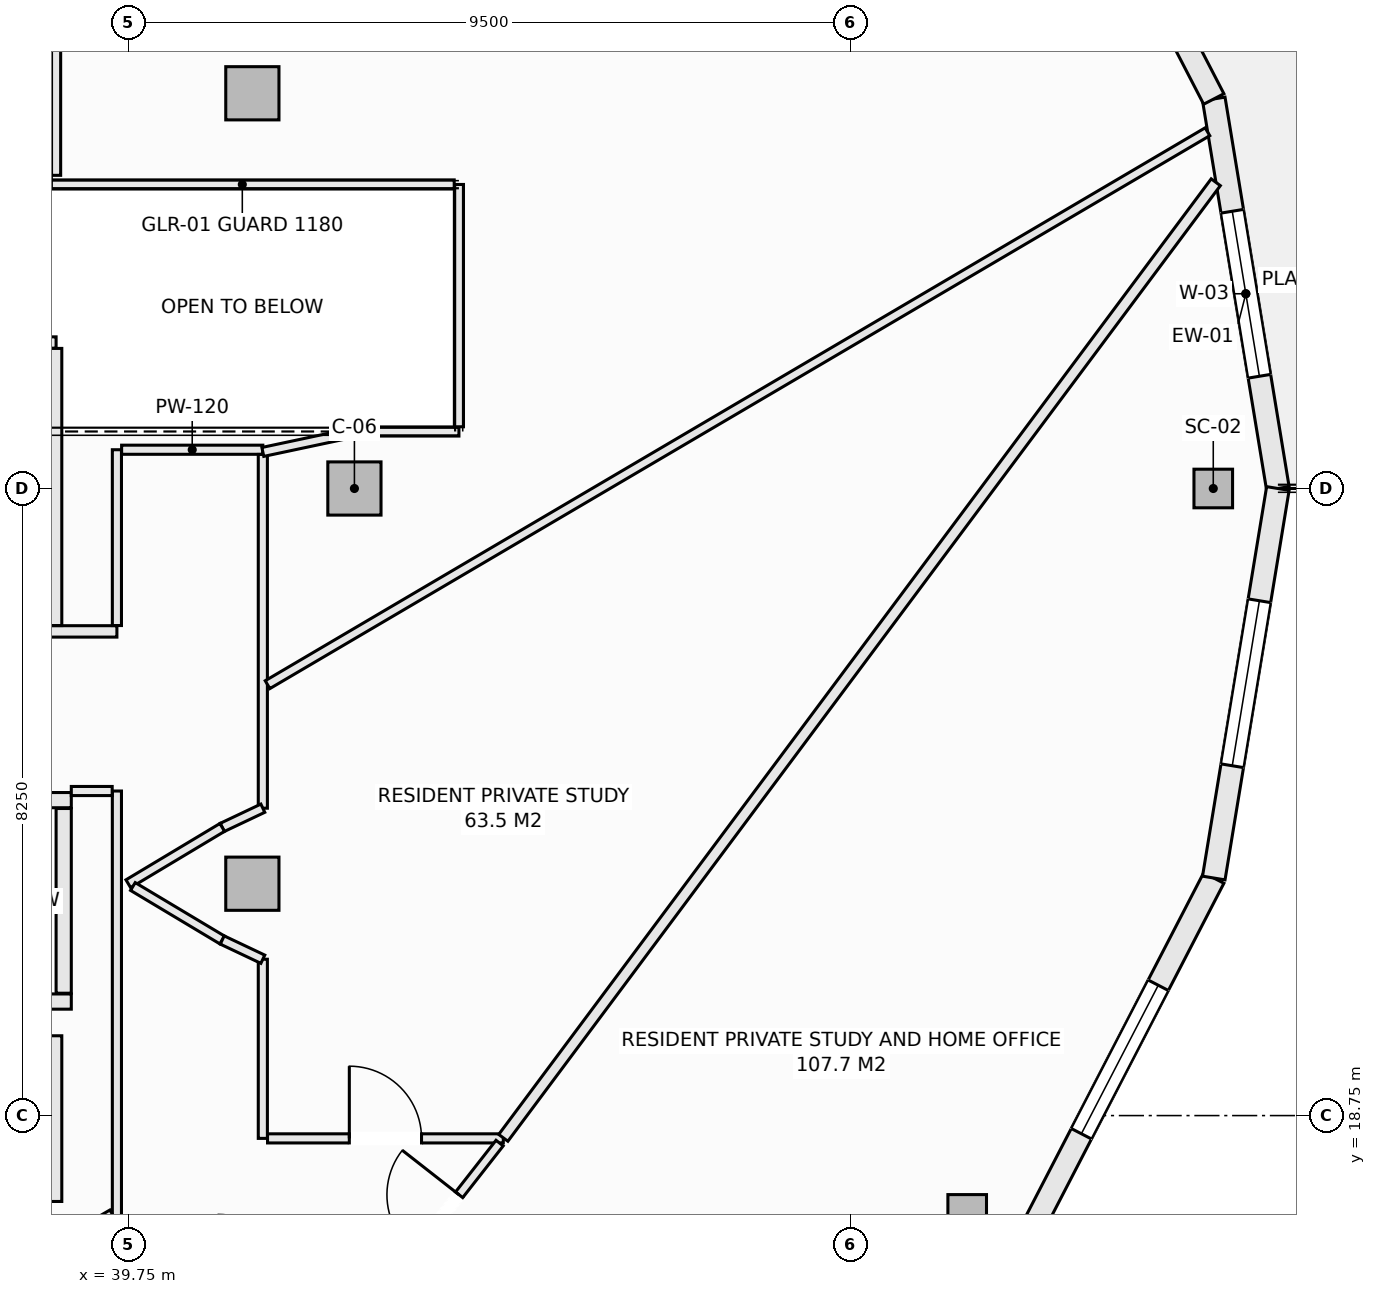
"""IFC4 building model, lengths in metres.
Left out: names, types, materials, properties, quantities, classifications, styles, units other than length and angle.
Written with IfcOpenShell. Run it as: python <this file> out.ifc"""

import sys

from ifc_helpers import new_model, si_unit, direction, frame, frame_2d, origin, origin_2d, place, context, subcontext, project, spatial, rectangle, hollow_rectangle, extrude, element, fill, save


model = new_model("IFC4")
c1 = context("Model", 3, precision=1e-05, world=origin(), true_north=direction((0.0, 1.0)))
c2 = subcontext(c1, "Body", "Model", "MODEL_VIEW")
j1 = project(units=[si_unit("LENGTHUNIT", "METRE"), si_unit("PLANEANGLEUNIT", "RADIAN")], contexts=[c1])
p1 = place(None, origin())
s1 = spatial("IfcSite", under=j1, at=p1, CompositionType="ELEMENT")
p2 = place(p1, origin())
s2 = spatial("IfcBuilding", under=s1, at=p2, CompositionType="ELEMENT")
p3 = place(p2, frame((0.0, 0.0, 199.7)))
s3 = spatial("IfcBuildingStorey", under=s2, at=p3, CompositionType="ELEMENT", Elevation=199.7)
for number, where, z_axis, x_axis in (
    (1, (54.025, 27.0, -0.27), (0.0, 0.0, 1.0), (1.0, 0.0, 0.0)),
    (2, (50.787, 17.456, -0.27), (0.0, 0.0, 1.0), (1.0, 0.0, 0.0)),
):
    element("IfcColumn", number, at=place(p3, frame(where, z_axis=z_axis, x_axis=x_axis)), inside=s3, PredefinedType="COLUMN", context=c2, shape_type="SweptSolid", body=[
        extrude(hollow_rectangle(XDim=0.508, YDim=0.508, WallThickness=0.019, at=origin_2d()), origin(), (0.0, 0.0, 1.0), 3.3),
    ])
for number, where, z_axis, x_axis in (
    (3, (42.725, 27.0, -0.27), (0.0, 0.0, 1.0), (1.0, 0.0, 0.0)),
    (4, (41.382, 32.199, -0.27), (0.0, 0.0, 1.0), (1.0, 0.0, 0.0)),
    (5, (41.382, 21.801, -0.27), (0.0, 0.0, 1.0), (1.0, 0.0, 0.0)),
):
    element("IfcColumn", number, at=place(p3, frame(where, z_axis=z_axis, x_axis=x_axis)), inside=s3, PredefinedType="COLUMN", context=c2, shape_type="SweptSolid", body=[
        extrude(rectangle(XDim=0.7, YDim=0.7, at=origin_2d()), origin(), (0.0, 0.0, 1.0), 3.3),
    ])
p4 = place(p3, frame((54.032, 32.125, 0.0), z_axis=(0.0, 0.0, 1.0), x_axis=(0.16237087798, -0.986729799886, 0.0)))
e6 = element("IfcWall", 6, at=p4, inside=s3, PredefinedType="SOLIDWALL", context=c2, shape_type="SweptSolid", body=[
    extrude(rectangle(XDim=5.193, YDim=0.3, at=frame_2d((2.597, 0.0))), origin(), (0.0, 0.0, 1.0), 2.605),
])
p5 = place(p4, frame((1.497, 0.0, 0.72)))
e7 = element("IfcOpeningElement", 7, at=p5, cuts=e6, PredefinedType="OPENING", context=c2, shape_type="SweptSolid", body=[
    extrude(rectangle(XDim=2.2, YDim=1.65, at=frame_2d((1.1, 0.825))), frame((0.0, 0.16, 0.0), z_axis=(0.0, -1.0, 0.0), x_axis=(1.0, 0.0, 0.0)), (0.0, 0.0, 1.0), 0.32),
])
p6 = place(p3, frame((51.559, 36.9, 0.0), z_axis=(0.0, 0.0, 1.0), x_axis=(0.459808219482, -0.888018243786, 0.0)))
e8 = element("IfcWall", 8, at=p6, inside=s3, PredefinedType="SOLIDWALL", context=c2, shape_type="SweptSolid", body=[
    extrude(rectangle(XDim=5.378, YDim=0.3, at=frame_2d((2.689, 0.0))), origin(), (0.0, 0.0, 1.0), 2.605),
])
p7 = place(p6, frame((1.789, 0.0, 0.0)))
e9 = element("IfcOpeningElement", 9, at=p7, cuts=e8, PredefinedType="OPENING", context=c2, shape_type="SweptSolid", body=[
    extrude(rectangle(XDim=1.8, YDim=2.25, at=frame_2d((0.9, 1.125))), frame((0.0, 0.16, 0.0), z_axis=(0.0, -1.0, 0.0), x_axis=(1.0, 0.0, 0.0)), (0.0, 0.0, 1.0), 0.32),
])
p8 = place(p3, frame((51.559, 17.1, 0.0), z_axis=(0.0, 0.0, 1.0), x_axis=(0.459808219482, 0.888018243786, 0.0)))
e10 = element("IfcWall", 10, at=p8, inside=s3, PredefinedType="SOLIDWALL", context=c2, shape_type="SweptSolid", body=[
    extrude(rectangle(XDim=5.378, YDim=0.3, at=frame_2d((2.689, 0.0))), origin(), (0.0, 0.0, 1.0), 2.605),
])
p9 = place(p8, frame((1.589, 0.0, 0.72)))
e11 = element("IfcOpeningElement", 11, at=p9, cuts=e10, PredefinedType="OPENING", context=c2, shape_type="SweptSolid", body=[
    extrude(rectangle(XDim=2.2, YDim=1.65, at=frame_2d((1.1, 0.825))), frame((0.0, 0.16, 0.0), z_axis=(0.0, -1.0, 0.0), x_axis=(1.0, 0.0, 0.0)), (0.0, 0.0, 1.0), 0.32),
])
p10 = place(p3, frame((54.032, 21.875, 0.0), z_axis=(0.0, 0.0, 1.0), x_axis=(0.16237087798, 0.986729799886, 0.0)))
e12 = element("IfcWall", 12, at=p10, inside=s3, PredefinedType="SOLIDWALL", context=c2, shape_type="SweptSolid", body=[
    extrude(rectangle(XDim=5.193, YDim=0.3, at=frame_2d((2.597, 0.0))), origin(), (0.0, 0.0, 1.0), 2.605),
])
p11 = place(p10, frame((1.497, 0.0, 0.72)))
e13 = element("IfcOpeningElement", 13, at=p11, cuts=e12, PredefinedType="OPENING", context=c2, shape_type="SweptSolid", body=[
    extrude(rectangle(XDim=2.2, YDim=1.65, at=frame_2d((1.1, 0.825))), frame((0.0, 0.16, 0.0), z_axis=(0.0, -1.0, 0.0), x_axis=(1.0, 0.0, 0.0)), (0.0, 0.0, 1.0), 0.32),
])
p12 = place(p3, frame((36.75, 22.9, 0.0), z_axis=(0.0, 0.0, 1.0), x_axis=(1.0, 0.0, 0.0)))
e14 = element("IfcWall", 14, at=p12, inside=s3, PredefinedType="SOLIDWALL", context=c2, shape_type="SweptSolid", body=[
    extrude(rectangle(XDim=2.25, YDim=0.2, at=frame_2d((1.125, 0.0))), origin(), (0.0, 0.0, 1.0), 3.03),
])
p13 = place(p12, frame((0.575, 0.0, 0.0)))
e15 = element("IfcOpeningElement", 15, at=p13, cuts=e14, PredefinedType="OPENING", context=c2, shape_type="SweptSolid", body=[
    extrude(rectangle(XDim=1.1, YDim=2.2, at=frame_2d((0.55, 1.1))), frame((0.0, 0.11, 0.0), z_axis=(0.0, -1.0, 0.0), x_axis=(1.0, 0.0, 0.0)), (0.0, 0.0, 1.0), 0.22),
])
p14 = place(p3, frame((36.75, 20.25, 0.0), z_axis=(0.0, 0.0, 1.0), x_axis=(1.0, 0.0, 0.0)))
e16 = element("IfcWall", 16, at=p14, inside=s3, PredefinedType="SOLIDWALL", context=c2, shape_type="SweptSolid", body=[
    extrude(rectangle(XDim=2.25, YDim=0.2, at=frame_2d((1.125, 0.0))), origin(), (0.0, 0.0, 1.0), 3.03),
])
p15 = place(p3, frame((38.9, 20.36, 0.0), z_axis=(0.0, 0.0, 1.0), x_axis=(0.0, 1.0, 0.0)))
e17 = element("IfcWall", 17, at=p15, inside=s3, PredefinedType="SOLIDWALL", context=c2, shape_type="SweptSolid", body=[
    extrude(rectangle(XDim=2.43, YDim=0.2, at=frame_2d((1.215, 0.0))), origin(), (0.0, 0.0, 1.0), 3.03),
])
p16 = place(p3, frame((29.96, 25.12, 0.0), z_axis=(0.0, 0.0, 1.0), x_axis=(1.0, 0.0, 0.0)))
e18 = element("IfcWall", 18, at=p16, inside=s3, PredefinedType="PARTITIONING", context=c2, shape_type="SweptSolid", body=[
    extrude(rectangle(XDim=9.64, YDim=0.15, at=frame_2d((4.82, 0.0))), origin(), (0.0, 0.0, 1.0), 3.03),
])
p17 = place(p16, frame((3.05, 0.0, 0.0)))
e19 = element("IfcOpeningElement", 19, at=p17, cuts=e18, PredefinedType="OPENING", context=c2, shape_type="SweptSolid", body=[
    extrude(rectangle(XDim=0.95, YDim=2.1, at=frame_2d((0.475, 1.05))), frame((0.0, 0.085, 0.0), z_axis=(0.0, -1.0, 0.0), x_axis=(1.0, 0.0, 0.0)), (0.0, 0.0, 1.0), 0.17),
])
p18 = place(p16, frame((7.265, 0.0, 0.0)))
e20 = element("IfcOpeningElement", 20, at=p18, cuts=e18, PredefinedType="OPENING", context=c2, shape_type="SweptSolid", body=[
    extrude(rectangle(XDim=0.95, YDim=2.1, at=frame_2d((0.475, 1.05))), frame((0.0, 0.085, 0.0), z_axis=(0.0, -1.0, 0.0), x_axis=(1.0, 0.0, 0.0)), (0.0, 0.0, 1.0), 0.17),
])
p19 = place(p3, frame((30.077, 28.92, 0.0), z_axis=(0.0, 0.0, 1.0), x_axis=(1.0, 0.0, 0.0)))
e21 = element("IfcWall", 21, at=p19, inside=s3, PredefinedType="PARTITIONING", context=c2, shape_type="SweptSolid", body=[
    extrude(rectangle(XDim=8.723, YDim=0.15, at=frame_2d((4.362, 0.0))), origin(), (0.0, 0.0, 1.0), 3.03),
])
p20 = place(p3, frame((38.8, 17.62, 0.0), z_axis=(0.0, 0.0, 1.0), x_axis=(0.0, 1.0, 0.0)))
e22 = element("IfcWall", 22, at=p20, inside=s3, PredefinedType="PARTITIONING", context=c2, shape_type="SweptSolid", body=[
    extrude(rectangle(XDim=2.18, YDim=0.15, at=frame_2d((1.09, 0.0))), origin(), (0.0, 0.0, 1.0), 3.03),
])
p21 = place(p3, frame((38.8, 25.197, 0.0), z_axis=(0.0, 0.0, 1.0), x_axis=(0.0, 1.0, 0.0)))
e23 = element("IfcWall", 23, at=p21, inside=s3, PredefinedType="PARTITIONING", context=c2, shape_type="SweptSolid", body=[
    extrude(rectangle(XDim=3.646, YDim=0.15, at=frame_2d((1.823, 0.0))), origin(), (0.0, 0.0, 1.0), 3.03),
])
p22 = place(p3, frame((38.8, 31.12, 0.0), z_axis=(0.0, 0.0, 1.0), x_axis=(0.0, 1.0, 0.0)))
e24 = element("IfcWall", 24, at=p22, inside=s3, PredefinedType="PARTITIONING", context=c2, shape_type="SweptSolid", body=[
    extrude(rectangle(XDim=2.63, YDim=0.12, at=frame_2d((1.315, 0.0))), origin(), (0.0, 0.0, 1.0), 3.03),
])
p23 = place(p3, frame((39.6, 16.5, 0.0), z_axis=(0.0, 0.0, 1.0), x_axis=(0.0, 1.0, 0.0)))
e25 = element("IfcWall", 25, at=p23, inside=s3, PredefinedType="PARTITIONING", context=c2, shape_type="SweptSolid", body=[
    extrude(rectangle(XDim=6.52, YDim=0.12, at=frame_2d((3.26, 0.0))), origin(), (0.0, 0.0, 1.0), 2.478),
])
p24 = place(p3, frame((39.6, 25.197, 0.0), z_axis=(0.0, 0.0, 1.0), x_axis=(0.0, 1.0, 0.0)))
e26 = element("IfcWall", 26, at=p24, inside=s3, PredefinedType="PARTITIONING", context=c2, shape_type="SweptSolid", body=[
    extrude(rectangle(XDim=2.313, YDim=0.12, at=frame_2d((1.156, 0.0))), origin(), (0.0, 0.0, 1.0), 3.03),
])
p25 = place(p3, frame((39.662, 27.51, 0.0), z_axis=(0.0, 0.0, 1.0), x_axis=(1.0, 0.0, 0.0)))
e27 = element("IfcWall", 27, at=p25, inside=s3, PredefinedType="PARTITIONING", context=c2, shape_type="SweptSolid", body=[
    extrude(rectangle(XDim=1.858, YDim=0.12, at=frame_2d((0.929, 0.0))), origin(), (0.0, 0.0, 1.0), 3.03),
])
p26 = place(p3, frame((41.52, 18.45, 0.0), z_axis=(0.0, 0.0, 1.0), x_axis=(0.0, 1.0, 0.0)))
e28 = element("IfcWall", 28, at=p26, inside=s3, PredefinedType="PARTITIONING", context=c2, shape_type="SweptSolid", body=[
    extrude(rectangle(XDim=2.357, YDim=0.12, at=frame_2d((1.178, 0.0))), origin(), (0.0, 0.0, 1.0), 3.03),
])
p27 = place(p3, frame((41.52, 22.794, 0.0), z_axis=(0.0, 0.0, 1.0), x_axis=(0.0, 1.0, 0.0)))
e29 = element("IfcWall", 29, at=p27, inside=s3, PredefinedType="PARTITIONING", context=c2, shape_type="SweptSolid", body=[
    extrude(rectangle(XDim=4.654, YDim=0.12, at=frame_2d((2.327, 0.0))), origin(), (0.0, 0.0, 1.0), 2.478),
])
p28 = place(p3, frame((40.986, 22.541, 0.0), z_axis=(0.0, 0.0, 1.0), x_axis=(0.903729424576, 0.428104107847, 0.0)))
e30 = element("IfcWall", 30, at=p28, inside=s3, PredefinedType="PARTITIONING", context=c2, shape_type="SweptSolid", body=[
    extrude(rectangle(XDim=0.591, YDim=0.12, at=frame_2d((0.295, 0.0))), origin(), (0.0, 0.0, 1.0), 3.03),
])
p29 = place(p3, frame((39.75, 21.8, 0.0), z_axis=(0.0, 0.0, 1.0), x_axis=(0.857702120906, 0.514146935996, 0.0)))
e31 = element("IfcWall", 31, at=p29, inside=s3, PredefinedType="PARTITIONING", context=c2, shape_type="SweptSolid", body=[
    extrude(rectangle(XDim=1.441, YDim=0.12, at=frame_2d((0.721, 0.0))), origin(), (0.0, 0.0, 1.0), 3.03),
])
p30 = place(p3, frame((39.81, 21.764, 0.0), z_axis=(0.0, 0.0, 1.0), x_axis=(0.858011245414, -0.513630901273, 0.0)))
e32 = element("IfcWall", 32, at=p30, inside=s3, PredefinedType="PARTITIONING", context=c2, shape_type="SweptSolid", body=[
    extrude(rectangle(XDim=1.37, YDim=0.12, at=frame_2d((0.685, 0.0))), origin(), (0.0, 0.0, 1.0), 3.03),
])
p31 = place(p3, frame((40.986, 21.06, 0.0), z_axis=(0.0, 0.0, 1.0), x_axis=(0.90356951601, -0.428441512621, 0.0)))
e33 = element("IfcWall", 33, at=p31, inside=s3, PredefinedType="PARTITIONING", context=c2, shape_type="SweptSolid", body=[
    extrude(rectangle(XDim=0.591, YDim=0.12, at=frame_2d((0.295, 0.0))), origin(), (0.0, 0.0, 1.0), 3.03),
])
p32 = place(p3, frame((41.582, 18.45, 0.0), z_axis=(0.0, 0.0, 1.0), x_axis=(1.0, 0.0, 0.0)))
e34 = element("IfcWall", 34, at=p32, inside=s3, PredefinedType="PARTITIONING", context=c2, shape_type="SweptSolid", body=[
    extrude(rectangle(XDim=3.102, YDim=0.12, at=frame_2d((1.551, 0.0))), origin(), (0.0, 0.0, 1.0), 3.03),
])
p33 = place(p32, frame((1.076, 0.0, 0.0)))
e35 = element("IfcOpeningElement", 35, at=p33, cuts=e34, PredefinedType="OPENING", context=c2, shape_type="SweptSolid", body=[
    extrude(rectangle(XDim=0.95, YDim=2.1, at=frame_2d((0.475, 1.05))), frame((0.0, 0.07, 0.0), z_axis=(0.0, -1.0, 0.0), x_axis=(1.0, 0.0, 0.0)), (0.0, 0.0, 1.0), 0.14),
])
p34 = place(p3, frame((43.157, 16.5, 0.0), z_axis=(0.0, 0.0, 1.0), x_axis=(0.616566276607, 0.787303008092, 0.0)))
e36 = element("IfcWall", 36, at=p34, inside=s3, PredefinedType="PARTITIONING", context=c2, shape_type="SweptSolid", body=[
    extrude(rectangle(XDim=2.398, YDim=0.12, at=frame_2d((1.199, 0.0))), origin(), (0.0, 0.0, 1.0), 3.03),
])
p35 = place(p34, frame((0.584, 0.0, 0.0)))
e37 = element("IfcOpeningElement", 37, at=p35, cuts=e36, PredefinedType="OPENING", context=c2, shape_type="SweptSolid", body=[
    extrude(rectangle(XDim=0.95, YDim=2.1, at=frame_2d((0.475, 1.05))), frame((0.0, 0.07, 0.0), z_axis=(0.0, -1.0, 0.0), x_axis=(1.0, 0.0, 0.0)), (0.0, 0.0, 1.0), 0.14),
])
p36 = place(p3, frame((39.0, 23.02, 0.0), z_axis=(0.0, 0.0, 1.0), x_axis=(1.0, 0.0, 0.0)))
e38 = element("IfcWall", 38, at=p36, inside=s3, PredefinedType="PARTITIONING", context=c2, shape_type="SweptSolid", body=[
    extrude(rectangle(XDim=0.538, YDim=0.12, at=frame_2d((0.269, 0.0))), origin(), (0.0, 0.0, 1.0), 3.03),
])
p37 = place(p3, frame((41.582, 24.419, 0.0), z_axis=(0.0, 0.0, 1.0), x_axis=(0.861940776748, 0.507008971694, 0.0)))
e39 = element("IfcWall", 39, at=p37, inside=s3, PredefinedType="PARTITIONING", context=c2, shape_type="SweptSolid", body=[
    extrude(rectangle(XDim=14.347, YDim=0.12, at=frame_2d((7.174, 0.0))), origin(), (0.0, 0.0, 1.0), 2.478),
])
p38 = place(p3, frame((36.112, 15.466, 0.0), z_axis=(0.0, 0.0, 1.0), x_axis=(0.864713842027, 0.502264841898, 0.0)))
e40 = element("IfcWall", 40, at=p38, inside=s3, PredefinedType="PARTITIONING", context=c2, shape_type="SweptSolid", body=[
    extrude(rectangle(XDim=3.962, YDim=0.12, at=frame_2d((1.981, 0.0))), origin(), (0.0, 0.0, 1.0), 2.478),
])
p39 = place(p3, frame((44.684, 18.457, 0.0), z_axis=(0.0, 0.0, 1.0), x_axis=(0.597750794318, 0.801681974284, 0.0)))
e41 = element("IfcWall", 41, at=p39, inside=s3, PredefinedType="PARTITIONING", context=c2, shape_type="SweptSolid", body=[
    extrude(rectangle(XDim=15.682, YDim=0.15, at=frame_2d((7.841, 0.0))), origin(), (0.0, 0.0, 1.0), 3.03),
])
p40 = place(p3, frame((41.52, 27.481, 0.0), z_axis=(0.0, 0.0, 1.0), x_axis=(0.978151658552, 0.207892599368, 0.0)))
e42 = element("IfcWall", 42, at=p40, inside=s3, PredefinedType="PARTITIONING", context=c2, shape_type="SweptSolid", body=[
    extrude(rectangle(XDim=1.294, YDim=0.12, at=frame_2d((0.647, 0.0))), origin(), (0.0, 0.0, 1.0), 3.03),
])
p41 = place(p3, frame((42.786, 27.75, 0.0), z_axis=(0.0, 0.0, 1.0), x_axis=(1.0, 0.0, 0.0)))
e43 = element("IfcWall", 43, at=p41, inside=s3, PredefinedType="PARTITIONING", context=c2, shape_type="SweptSolid", body=[
    extrude(rectangle(XDim=1.314, YDim=0.12, at=frame_2d((0.657, 0.0))), origin(), (0.0, 0.0, 1.0), 3.03),
])
p42 = place(p3, frame((44.1, 27.812, 0.0), z_axis=(0.0, 0.0, 1.0), x_axis=(0.0, 1.0, 0.0)))
e44 = element("IfcWall", 44, at=p42, inside=s3, PredefinedType="PARTITIONING", context=c2, shape_type="SweptSolid", body=[
    extrude(rectangle(XDim=3.188, YDim=0.12, at=frame_2d((1.594, 0.0))), origin(), (0.0, 0.0, 1.0), 3.03),
])
p43 = place(p3, frame((38.738, 31.0, 0.0), z_axis=(0.0, 0.0, 1.0), x_axis=(1.0, 0.0, 0.0)))
e45 = element("IfcWall", 45, at=p43, inside=s3, PredefinedType="PARTITIONING", context=c2, shape_type="SweptSolid", body=[
    extrude(rectangle(XDim=5.3, YDim=0.12, at=frame_2d((2.65, 0.0))), origin(), (0.0, 0.0, 1.0), 3.03),
])
p44 = place(p5, origin())
e46 = element("IfcWindow", 46, at=p44, inside=s3, PartitioningType="SINGLE_PANEL", PredefinedType="WINDOW", context=c2, shape_type="SweptSolid", body=[
    extrude(rectangle(XDim=2.2, YDim=1.65, at=frame_2d((1.1, 0.825))), frame((0.0, 0.03, 0.0), z_axis=(0.0, -1.0, 0.0), x_axis=(1.0, 0.0, 0.0)), (0.0, 0.0, 1.0), 0.06),
])
fill(e7, e46)
p45 = place(p9, origin())
e47 = element("IfcWindow", 47, at=p45, inside=s3, PartitioningType="SINGLE_PANEL", PredefinedType="WINDOW", context=c2, shape_type="SweptSolid", body=[
    extrude(rectangle(XDim=2.2, YDim=1.65, at=frame_2d((1.1, 0.825))), frame((0.0, 0.03, 0.0), z_axis=(0.0, -1.0, 0.0), x_axis=(1.0, 0.0, 0.0)), (0.0, 0.0, 1.0), 0.06),
])
fill(e11, e47)
p46 = place(p11, origin())
e48 = element("IfcWindow", 48, at=p46, inside=s3, PartitioningType="SINGLE_PANEL", PredefinedType="WINDOW", context=c2, shape_type="SweptSolid", body=[
    extrude(rectangle(XDim=2.2, YDim=1.65, at=frame_2d((1.1, 0.825))), frame((0.0, 0.03, 0.0), z_axis=(0.0, -1.0, 0.0), x_axis=(1.0, 0.0, 0.0)), (0.0, 0.0, 1.0), 0.06),
])
fill(e13, e48)
p47 = place(p35, origin())
e49 = element("IfcDoor", 49, at=p47, inside=s3, OperationType="SINGLE_SWING_RIGHT", PredefinedType="DOOR", context=c2, shape_type="SweptSolid", body=[
    extrude(rectangle(XDim=0.95, YDim=2.1, at=frame_2d((0.475, 1.05))), frame((0.0, 0.025, 0.0), z_axis=(0.0, -1.0, 0.0), x_axis=(1.0, 0.0, 0.0)), (0.0, 0.0, 1.0), 0.05),
])
fill(e37, e49)
p48 = place(p33, origin())
e50 = element("IfcDoor", 50, at=p48, inside=s3, OperationType="SINGLE_SWING_LEFT", PredefinedType="DOOR", context=c2, shape_type="SweptSolid", body=[
    extrude(rectangle(XDim=0.95, YDim=2.1, at=frame_2d((0.475, 1.05))), frame((0.0, 0.025, 0.0), z_axis=(0.0, -1.0, 0.0), x_axis=(1.0, 0.0, 0.0)), (0.0, 0.0, 1.0), 0.05),
])
fill(e35, e50)
save(model, sys.argv[1])
